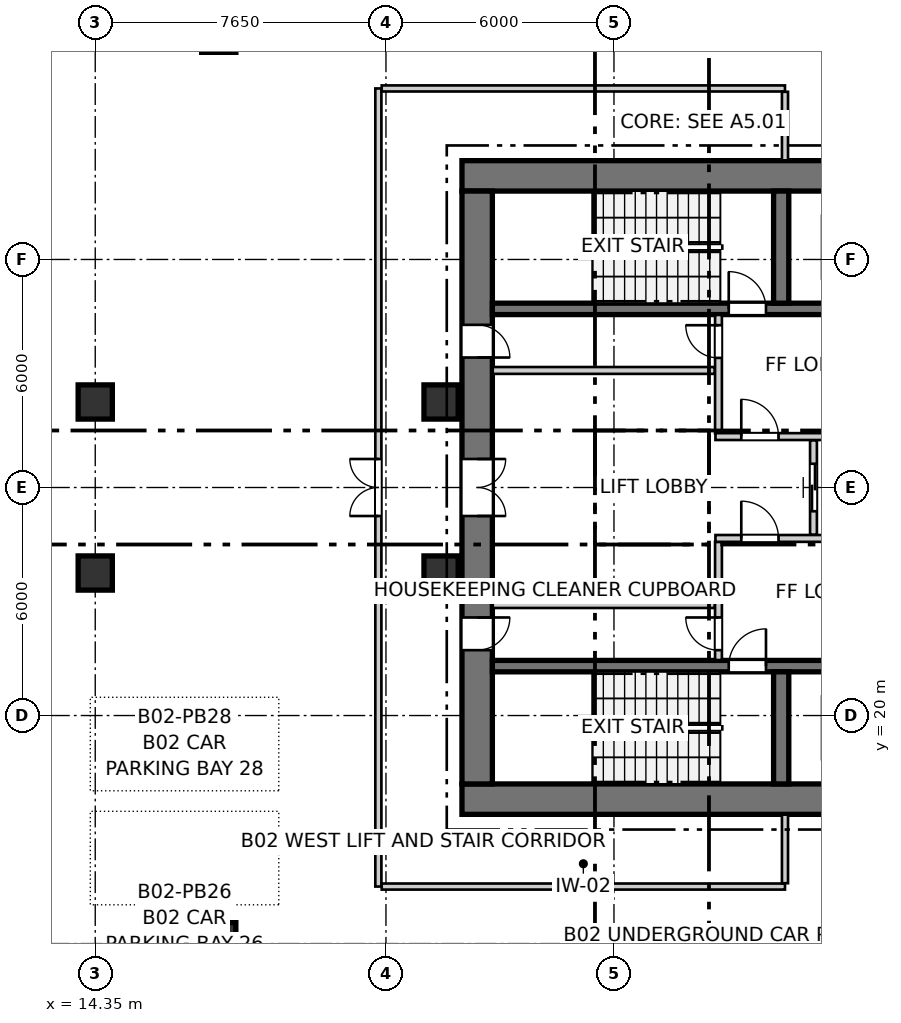
"""IFC4 building model, lengths in metres.
Left out: names, types, materials, properties, quantities, classifications, styles, units other than length and angle.
Written with IfcOpenShell. Run it as: python <this file> out.ifc"""

import sys

from ifc_helpers import new_model, si_unit, direction, frame, frame_2d, origin, origin_2d, place, context, subcontext, project, spatial, rectangle, extrude, source, transform, mapped, element, fill, save


model = new_model("IFC4")
c1 = context("Model", 3, precision=1e-05, world=origin(), true_north=direction((0.0, 1.0)))
c2 = subcontext(c1, "Body", "Model", "MODEL_VIEW")
j1 = project(units=[si_unit("LENGTHUNIT", "METRE"), si_unit("PLANEANGLEUNIT", "RADIAN")], contexts=[c1])
p1 = place(None, origin())
s1 = spatial("IfcSite", under=j1, at=p1, CompositionType="ELEMENT")
p2 = place(p1, origin())
s2 = spatial("IfcBuilding", under=s1, at=p2, CompositionType="ELEMENT")
p3 = place(p2, frame((0.0, 0.0, -8.7)))
s3 = spatial("IfcBuildingStorey", under=s2, at=p3, CompositionType="ELEMENT", Elevation=-8.7)
m1 = source(origin(), c2, "Body", "SweptSolid", [
    extrude(rectangle(XDim=0.9, YDim=0.9, at=origin_2d()), origin(), (0.0, 0.0, 1.0), 4.2),
])
for number, where, z_axis, x_axis in (
    (1, (14.35, 23.75, 0.0), (0.0, 0.0, 1.0), (1.0, 0.0, 0.0)),
    (2, (23.45, 23.75, 0.0), (0.0, 0.0, 1.0), (1.0, 0.0, 0.0)),
    (3, (14.35, 28.25, 0.0), (0.0, 0.0, 1.0), (1.0, 0.0, 0.0)),
    (4, (23.45, 28.25, 0.0), (0.0, 0.0, 1.0), (1.0, 0.0, 0.0)),
    (5, (17.6, 14.1, 0.0), (0.0, 0.0, 1.0), (1.0, 0.0, 0.0)),
    (6, (17.6, 37.9, 0.0), (0.0, 0.0, 1.0), (1.0, 0.0, 0.0)),
):
    element("IfcColumn", number, at=place(p3, frame(where, z_axis=z_axis, x_axis=x_axis)), inside=s3, PredefinedType="COLUMN", context=c2, shape_type="MappedRepresentation", body=[
        mapped(m1, transform((0.0, 0.0, 0.0), x_axis=(1.0, 0.0, 0.0), y_axis=(0.0, 1.0, 0.0), z_axis=(0.0, 0.0, 1.0), scale=1.0)),
    ])
for number, where, z_axis, x_axis in (
    (7, (24.0, 17.8, 0.0), (0.0, 0.0, 1.0), (1.0, 0.0, 0.0)),
    (8, (36.7, 34.2, 0.0), (0.0, 0.0, 1.0), (-1.0, 0.0, 0.0)),
):
    element("IfcWall", number, at=place(p3, frame(where, z_axis=z_axis, x_axis=x_axis)), inside=s3, PredefinedType="SHEAR", context=c2, shape_type="SweptSolid", body=[
        extrude(rectangle(XDim=12.7, YDim=0.8, at=frame_2d((6.35, 0.0))), origin(), (0.0, 0.0, 1.0), 4.2),
    ])
p4 = place(p3, frame((24.4, 33.8, 0.0), z_axis=(0.0, 0.0, 1.0), x_axis=(0.0, -1.0, 0.0)))
e9 = element("IfcWall", 9, at=p4, inside=s3, PredefinedType="SHEAR", context=c2, shape_type="SweptSolid", body=[
    extrude(rectangle(XDim=15.6, YDim=0.8, at=frame_2d((7.8, 0.0))), origin(), (0.0, 0.0, 1.0), 4.2),
])
p5 = place(p4, frame((7.05, 0.0, 0.0)))
e10 = element("IfcOpeningElement", 10, at=p5, cuts=e9, PredefinedType="OPENING", context=c2, shape_type="SweptSolid", body=[
    extrude(rectangle(XDim=1.5, YDim=2.15, at=frame_2d((0.75, 1.075))), frame((0.0, 0.41, 0.0), z_axis=(0.0, -1.0, 0.0), x_axis=(1.0, 0.0, 0.0)), (0.0, 0.0, 1.0), 0.82),
])
p6 = place(p4, frame((3.52, 0.0, 0.0)))
e11 = element("IfcOpeningElement", 11, at=p6, cuts=e9, PredefinedType="OPENING", context=c2, shape_type="SweptSolid", body=[
    extrude(rectangle(XDim=0.86, YDim=2.05, at=frame_2d((0.43, 1.025))), frame((0.0, 0.41, 0.0), z_axis=(0.0, -1.0, 0.0), x_axis=(1.0, 0.0, 0.0)), (0.0, 0.0, 1.0), 0.82),
])
p7 = place(p4, frame((11.22, 0.0, 0.0)))
e12 = element("IfcOpeningElement", 12, at=p7, cuts=e9, PredefinedType="OPENING", context=c2, shape_type="SweptSolid", body=[
    extrude(rectangle(XDim=0.86, YDim=2.05, at=frame_2d((0.43, 1.025))), frame((0.0, 0.41, 0.0), z_axis=(0.0, -1.0, 0.0), x_axis=(1.0, 0.0, 0.0)), (0.0, 0.0, 1.0), 0.82),
])
p8 = place(p3, frame((24.8, 21.3, 0.0), z_axis=(0.0, 0.0, 1.0), x_axis=(1.0, 0.0, 0.0)))
e13 = element("IfcWall", 13, at=p8, inside=s3, PredefinedType="SHEAR", context=c2, shape_type="SweptSolid", body=[
    extrude(rectangle(XDim=11.1, YDim=0.3, at=frame_2d((5.55, 0.0))), origin(), (0.0, 0.0, 1.0), 4.2),
])
p9 = place(p8, frame((6.22, 0.0, 0.0)))
e14 = element("IfcOpeningElement", 14, at=p9, cuts=e13, PredefinedType="OPENING", context=c2, shape_type="SweptSolid", body=[
    extrude(rectangle(XDim=0.98, YDim=2.15, at=frame_2d((0.49, 1.075))), frame((0.0, 0.16, 0.0), z_axis=(0.0, -1.0, 0.0), x_axis=(1.0, 0.0, 0.0)), (0.0, 0.0, 1.0), 0.32),
])
p10 = place(p8, frame((9.15, 0.0, 0.0)))
e15 = element("IfcOpeningElement", 15, at=p10, cuts=e13, PredefinedType="OPENING", context=c2, shape_type="SweptSolid", body=[
    extrude(rectangle(XDim=1.15, YDim=2.15, at=frame_2d((0.575, 1.075))), frame((0.0, 0.16, 0.0), z_axis=(0.0, -1.0, 0.0), x_axis=(1.0, 0.0, 0.0)), (0.0, 0.0, 1.0), 0.32),
])
p11 = place(p3, frame((32.4, 18.2, 0.0), z_axis=(0.0, 0.0, 1.0), x_axis=(0.0, 1.0, 0.0)))
e16 = element("IfcWall", 16, at=p11, inside=s3, PredefinedType="SHEAR", context=c2, shape_type="SweptSolid", body=[
    extrude(rectangle(XDim=2.95, YDim=0.4, at=frame_2d((1.475, 0.0))), origin(), (0.0, 0.0, 1.0), 4.2),
])
p12 = place(p3, frame((24.8, 30.7, 0.0), z_axis=(0.0, 0.0, 1.0), x_axis=(1.0, 0.0, 0.0)))
e17 = element("IfcWall", 17, at=p12, inside=s3, PredefinedType="SHEAR", context=c2, shape_type="SweptSolid", body=[
    extrude(rectangle(XDim=11.1, YDim=0.3, at=frame_2d((5.55, 0.0))), origin(), (0.0, 0.0, 1.0), 4.2),
])
p13 = place(p12, frame((6.22, 0.0, 0.0)))
e18 = element("IfcOpeningElement", 18, at=p13, cuts=e17, PredefinedType="OPENING", context=c2, shape_type="SweptSolid", body=[
    extrude(rectangle(XDim=0.98, YDim=2.15, at=frame_2d((0.49, 1.075))), frame((0.0, 0.16, 0.0), z_axis=(0.0, -1.0, 0.0), x_axis=(1.0, 0.0, 0.0)), (0.0, 0.0, 1.0), 0.32),
])
p14 = place(p12, frame((9.15, 0.0, 0.0)))
e19 = element("IfcOpeningElement", 19, at=p14, cuts=e17, PredefinedType="OPENING", context=c2, shape_type="SweptSolid", body=[
    extrude(rectangle(XDim=1.15, YDim=2.15, at=frame_2d((0.575, 1.075))), frame((0.0, 0.16, 0.0), z_axis=(0.0, -1.0, 0.0), x_axis=(1.0, 0.0, 0.0)), (0.0, 0.0, 1.0), 0.32),
])
p15 = place(p3, frame((32.4, 30.85, 0.0), z_axis=(0.0, 0.0, 1.0), x_axis=(0.0, 1.0, 0.0)))
e20 = element("IfcWall", 20, at=p15, inside=s3, PredefinedType="SHEAR", context=c2, shape_type="SweptSolid", body=[
    extrude(rectangle(XDim=2.95, YDim=0.4, at=frame_2d((1.475, 0.0))), origin(), (0.0, 0.0, 1.0), 4.2),
])
p16 = place(p3, frame((30.75, 21.46, 0.0), z_axis=(0.0, 0.0, 1.0), x_axis=(0.0, 1.0, 0.0)))
e21 = element("IfcWall", 21, at=p16, inside=s3, PredefinedType="PARTITIONING", context=c2, shape_type="SweptSolid", body=[
    extrude(rectangle(XDim=3.11, YDim=0.18, at=frame_2d((1.555, 0.0))), origin(), (0.0, 0.0, 1.0), 4.2),
])
p17 = place(p16, frame((0.26, 0.0, 0.0)))
e22 = element("IfcOpeningElement", 22, at=p17, cuts=e21, PredefinedType="OPENING", context=c2, shape_type="SweptSolid", body=[
    extrude(rectangle(XDim=0.86, YDim=2.05, at=frame_2d((0.43, 1.025))), frame((0.0, 0.1, 0.0), z_axis=(0.0, -1.0, 0.0), x_axis=(1.0, 0.0, 0.0)), (0.0, 0.0, 1.0), 0.2),
])
p18 = place(p3, frame((30.67, 24.66, 0.0), z_axis=(0.0, 0.0, 1.0), x_axis=(1.0, 0.0, 0.0)))
e23 = element("IfcWall", 23, at=p18, inside=s3, PredefinedType="PARTITIONING", context=c2, shape_type="SweptSolid", body=[
    extrude(rectangle(XDim=5.22, YDim=0.18, at=frame_2d((2.61, 0.0))), origin(), (0.0, 0.0, 1.0), 4.2),
])
p19 = place(p18, frame((0.68, 0.0, 0.0)))
e24 = element("IfcOpeningElement", 24, at=p19, cuts=e23, PredefinedType="OPENING", context=c2, shape_type="SweptSolid", body=[
    extrude(rectangle(XDim=0.98, YDim=2.15, at=frame_2d((0.49, 1.075))), frame((0.0, 0.1, 0.0), z_axis=(0.0, -1.0, 0.0), x_axis=(1.0, 0.0, 0.0)), (0.0, 0.0, 1.0), 0.2),
])
p20 = place(p3, frame((30.75, 27.43, 0.0), z_axis=(0.0, 0.0, 1.0), x_axis=(0.0, 1.0, 0.0)))
e25 = element("IfcWall", 25, at=p20, inside=s3, PredefinedType="PARTITIONING", context=c2, shape_type="SweptSolid", body=[
    extrude(rectangle(XDim=3.11, YDim=0.18, at=frame_2d((1.555, 0.0))), origin(), (0.0, 0.0, 1.0), 4.2),
])
p21 = place(p20, frame((1.98, 0.0, 0.0)))
e26 = element("IfcOpeningElement", 26, at=p21, cuts=e25, PredefinedType="OPENING", context=c2, shape_type="SweptSolid", body=[
    extrude(rectangle(XDim=0.86, YDim=2.05, at=frame_2d((0.43, 1.025))), frame((0.0, 0.1, 0.0), z_axis=(0.0, -1.0, 0.0), x_axis=(1.0, 0.0, 0.0)), (0.0, 0.0, 1.0), 0.2),
])
p22 = place(p3, frame((30.67, 27.34, 0.0), z_axis=(0.0, 0.0, 1.0), x_axis=(1.0, 0.0, 0.0)))
e27 = element("IfcWall", 27, at=p22, inside=s3, PredefinedType="PARTITIONING", context=c2, shape_type="SweptSolid", body=[
    extrude(rectangle(XDim=5.22, YDim=0.18, at=frame_2d((2.61, 0.0))), origin(), (0.0, 0.0, 1.0), 4.2),
])
p23 = place(p22, frame((0.68, 0.0, 0.0)))
e28 = element("IfcOpeningElement", 28, at=p23, cuts=e27, PredefinedType="OPENING", context=c2, shape_type="SweptSolid", body=[
    extrude(rectangle(XDim=0.98, YDim=2.15, at=frame_2d((0.49, 1.075))), frame((0.0, 0.1, 0.0), z_axis=(0.0, -1.0, 0.0), x_axis=(1.0, 0.0, 0.0)), (0.0, 0.0, 1.0), 0.2),
])
p24 = place(p3, frame((33.25, 24.76, 0.0), z_axis=(0.0, 0.0, 1.0), x_axis=(0.0, 1.0, 0.0)))
e29 = element("IfcWall", 29, at=p24, inside=s3, PredefinedType="PARTITIONING", context=c2, shape_type="SweptSolid", body=[
    extrude(rectangle(XDim=2.48, YDim=0.18, at=frame_2d((1.24, 0.0))), origin(), (0.0, 0.0, 1.0), 4.2),
])
p25 = place(p24, frame((0.615, 0.0, 0.0)))
e30 = element("IfcOpeningElement", 30, at=p25, cuts=e29, PredefinedType="OPENING", context=c2, shape_type="SweptSolid", body=[
    extrude(rectangle(XDim=1.25, YDim=2.15, at=frame_2d((0.625, 1.075))), frame((0.0, 0.1, 0.0), z_axis=(0.0, -1.0, 0.0), x_axis=(1.0, 0.0, 0.0)), (0.0, 0.0, 1.0), 0.2),
])
for number, where, z_axis, x_axis in (
    (31, (24.81, 22.92, 0.0), (0.0, 0.0, 1.0), (1.0, 0.0, 0.0)),
    (32, (24.81, 29.08, 0.0), (0.0, 0.0, 1.0), (1.0, 0.0, 0.0)),
):
    element("IfcWall", number, at=place(p3, frame(where, z_axis=z_axis, x_axis=x_axis)), inside=s3, PredefinedType="PARTITIONING", context=c2, shape_type="SweptSolid", body=[
        extrude(rectangle(XDim=5.84, YDim=0.18, at=frame_2d((2.92, 0.0))), origin(), (0.0, 0.0, 1.0), 4.2),
    ])
p26 = place(p3, frame((21.8, 15.5, 0.0), z_axis=(0.0, 0.0, 1.0), x_axis=(0.0, 1.0, 0.0)))
e33 = element("IfcWall", 33, at=p26, inside=s3, PredefinedType="PARTITIONING", context=c2, shape_type="SweptSolid", body=[
    extrude(rectangle(XDim=21.0, YDim=0.16, at=frame_2d((10.5, 0.0))), origin(), (0.0, 0.0, 1.0), 4.2),
])
p27 = place(p26, frame((9.75, 0.0, 0.0)))
e34 = element("IfcOpeningElement", 34, at=p27, cuts=e33, PredefinedType="OPENING", context=c2, shape_type="SweptSolid", body=[
    extrude(rectangle(XDim=1.5, YDim=2.15, at=frame_2d((0.75, 1.075))), frame((0.0, 0.09, 0.0), z_axis=(0.0, -1.0, 0.0), x_axis=(1.0, 0.0, 0.0)), (0.0, 0.0, 1.0), 0.18),
])
p28 = place(p3, frame((21.888, 15.5, 0.0), z_axis=(0.0, 0.0, 1.0), x_axis=(1.0, 0.0, 0.0)))
e35 = element("IfcWall", 35, at=p28, inside=s3, PredefinedType="PARTITIONING", context=c2, shape_type="SweptSolid", body=[
    extrude(rectangle(XDim=10.612, YDim=0.16, at=frame_2d((5.306, 0.0))), origin(), (0.0, 0.0, 1.0), 4.2),
])
p29 = place(p3, frame((32.5, 15.588, 0.0), z_axis=(0.0, 0.0, 1.0), x_axis=(0.0, 1.0, 0.0)))
e36 = element("IfcWall", 36, at=p29, inside=s3, PredefinedType="PARTITIONING", context=c2, shape_type="SweptSolid", body=[
    extrude(rectangle(XDim=1.804, YDim=0.16, at=frame_2d((0.902, 0.0))), origin(), (0.0, 0.0, 1.0), 4.2),
])
p30 = place(p3, frame((21.888, 36.5, 0.0), z_axis=(0.0, 0.0, 1.0), x_axis=(1.0, 0.0, 0.0)))
e37 = element("IfcWall", 37, at=p30, inside=s3, PredefinedType="PARTITIONING", context=c2, shape_type="SweptSolid", body=[
    extrude(rectangle(XDim=10.612, YDim=0.16, at=frame_2d((5.306, 0.0))), origin(), (0.0, 0.0, 1.0), 4.2),
])
p31 = place(p3, frame((32.5, 34.608, 0.0), z_axis=(0.0, 0.0, 1.0), x_axis=(0.0, 1.0, 0.0)))
e38 = element("IfcWall", 38, at=p31, inside=s3, PredefinedType="PARTITIONING", context=c2, shape_type="SweptSolid", body=[
    extrude(rectangle(XDim=1.804, YDim=0.16, at=frame_2d((0.902, 0.0))), origin(), (0.0, 0.0, 1.0), 4.2),
])
m2 = source(origin(), c2, "Body", "SweptSolid", [
    extrude(rectangle(XDim=0.98, YDim=2.15, at=frame_2d((0.49, 1.075))), frame((0.0, 0.025, 0.0), z_axis=(0.0, -1.0, 0.0), x_axis=(1.0, 0.0, 0.0)), (0.0, 0.0, 1.0), 0.05),
])
p32 = place(p9, origin())
e39 = element("IfcDoor", 39, at=p32, inside=s3, OperationType="SINGLE_SWING_RIGHT", PredefinedType="DOOR", context=c2, shape_type="MappedRepresentation", body=[
    mapped(m2, transform((0.0, 0.0, 0.0), x_axis=(1.0, 0.0, 0.0), y_axis=(0.0, 1.0, 0.0), z_axis=(0.0, 0.0, 1.0), scale=1.0)),
])
fill(e14, e39)
p33 = place(p13, origin())
e40 = element("IfcDoor", 40, at=p33, inside=s3, OperationType="SINGLE_SWING_LEFT", PredefinedType="DOOR", context=c2, shape_type="MappedRepresentation", body=[
    mapped(m2, transform((0.0, 0.0, 0.0), x_axis=(1.0, 0.0, 0.0), y_axis=(0.0, 1.0, 0.0), z_axis=(0.0, 0.0, 1.0), scale=1.0)),
])
fill(e18, e40)
m3 = source(origin(), c2, "Body", "SweptSolid", [
    extrude(rectangle(XDim=1.5, YDim=2.15, at=frame_2d((0.75, 1.075))), frame((0.0, 0.025, 0.0), z_axis=(0.0, -1.0, 0.0), x_axis=(1.0, 0.0, 0.0)), (0.0, 0.0, 1.0), 0.05),
])
p34 = place(p5, origin())
e41 = element("IfcDoor", 41, at=p34, inside=s3, OperationType="DOUBLE_DOOR_SINGLE_SWING", PredefinedType="DOOR", context=c2, shape_type="MappedRepresentation", body=[
    mapped(m3, transform((0.0, 0.0, 0.0), x_axis=(1.0, 0.0, 0.0), y_axis=(0.0, 1.0, 0.0), z_axis=(0.0, 0.0, 1.0), scale=1.0)),
])
fill(e10, e41)
m4 = source(origin(), c2, "Body", "SweptSolid", [
    extrude(rectangle(XDim=0.86, YDim=2.05, at=frame_2d((0.43, 1.025))), frame((0.0, 0.025, 0.0), z_axis=(0.0, -1.0, 0.0), x_axis=(1.0, 0.0, 0.0)), (0.0, 0.0, 1.0), 0.05),
])
p35 = place(p6, origin())
e42 = element("IfcDoor", 42, at=p35, inside=s3, OperationType="SINGLE_SWING_RIGHT", PredefinedType="DOOR", context=c2, shape_type="MappedRepresentation", body=[
    mapped(m4, transform((0.0, 0.0, 0.0), x_axis=(1.0, 0.0, 0.0), y_axis=(0.0, 1.0, 0.0), z_axis=(0.0, 0.0, 1.0), scale=1.0)),
])
fill(e11, e42)
p36 = place(p7, origin())
e43 = element("IfcDoor", 43, at=p36, inside=s3, OperationType="SINGLE_SWING_LEFT", PredefinedType="DOOR", context=c2, shape_type="MappedRepresentation", body=[
    mapped(m4, transform((0.0, 0.0, 0.0), x_axis=(1.0, 0.0, 0.0), y_axis=(0.0, 1.0, 0.0), z_axis=(0.0, 0.0, 1.0), scale=1.0)),
])
fill(e12, e43)
p37 = place(p17, origin())
e44 = element("IfcDoor", 44, at=p37, inside=s3, OperationType="SINGLE_SWING_RIGHT", PredefinedType="DOOR", context=c2, shape_type="MappedRepresentation", body=[
    mapped(m4, transform((0.0, 0.0, 0.0), x_axis=(1.0, 0.0, 0.0), y_axis=(0.0, 1.0, 0.0), z_axis=(0.0, 0.0, 1.0), scale=1.0)),
])
fill(e22, e44)
p38 = place(p19, origin())
e45 = element("IfcDoor", 45, at=p38, inside=s3, OperationType="SINGLE_SWING_LEFT", PredefinedType="DOOR", context=c2, shape_type="MappedRepresentation", body=[
    mapped(m2, transform((0.0, 0.0, 0.0), x_axis=(1.0, 0.0, 0.0), y_axis=(0.0, 1.0, 0.0), z_axis=(0.0, 0.0, 1.0), scale=1.0)),
])
fill(e24, e45)
p39 = place(p21, origin())
e46 = element("IfcDoor", 46, at=p39, inside=s3, OperationType="SINGLE_SWING_RIGHT", PredefinedType="DOOR", context=c2, shape_type="MappedRepresentation", body=[
    mapped(m4, transform((0.0, 0.0, 0.0), x_axis=(1.0, 0.0, 0.0), y_axis=(0.0, 1.0, 0.0), z_axis=(0.0, 0.0, 1.0), scale=1.0)),
])
fill(e26, e46)
p40 = place(p23, origin())
e47 = element("IfcDoor", 47, at=p40, inside=s3, OperationType="SINGLE_SWING_LEFT", PredefinedType="DOOR", context=c2, shape_type="MappedRepresentation", body=[
    mapped(m2, transform((0.0, 0.0, 0.0), x_axis=(1.0, 0.0, 0.0), y_axis=(0.0, 1.0, 0.0), z_axis=(0.0, 0.0, 1.0), scale=1.0)),
])
fill(e28, e47)
m5 = source(origin(), c2, "Body", "SweptSolid", [
    extrude(rectangle(XDim=1.25, YDim=2.15, at=frame_2d((0.625, 1.075))), frame((0.0, 0.025, 0.0), z_axis=(0.0, -1.0, 0.0), x_axis=(1.0, 0.0, 0.0)), (0.0, 0.0, 1.0), 0.05),
])
p41 = place(p25, origin())
e48 = element("IfcDoor", 48, at=p41, inside=s3, OperationType="DOUBLE_DOOR_SLIDING", PredefinedType="DOOR", context=c2, shape_type="MappedRepresentation", body=[
    mapped(m5, transform((0.0, 0.0, 0.0), x_axis=(1.0, 0.0, 0.0), y_axis=(0.0, 1.0, 0.0), z_axis=(0.0, 0.0, 1.0), scale=1.0)),
])
fill(e30, e48)
p42 = place(p27, origin())
e49 = element("IfcDoor", 49, at=p42, inside=s3, OperationType="DOUBLE_DOOR_SINGLE_SWING", PredefinedType="DOOR", context=c2, shape_type="MappedRepresentation", body=[
    mapped(m3, transform((0.0, 0.0, 0.0), x_axis=(1.0, 0.0, 0.0), y_axis=(0.0, 1.0, 0.0), z_axis=(0.0, 0.0, 1.0), scale=1.0)),
])
fill(e34, e49)
save(model, sys.argv[1])
